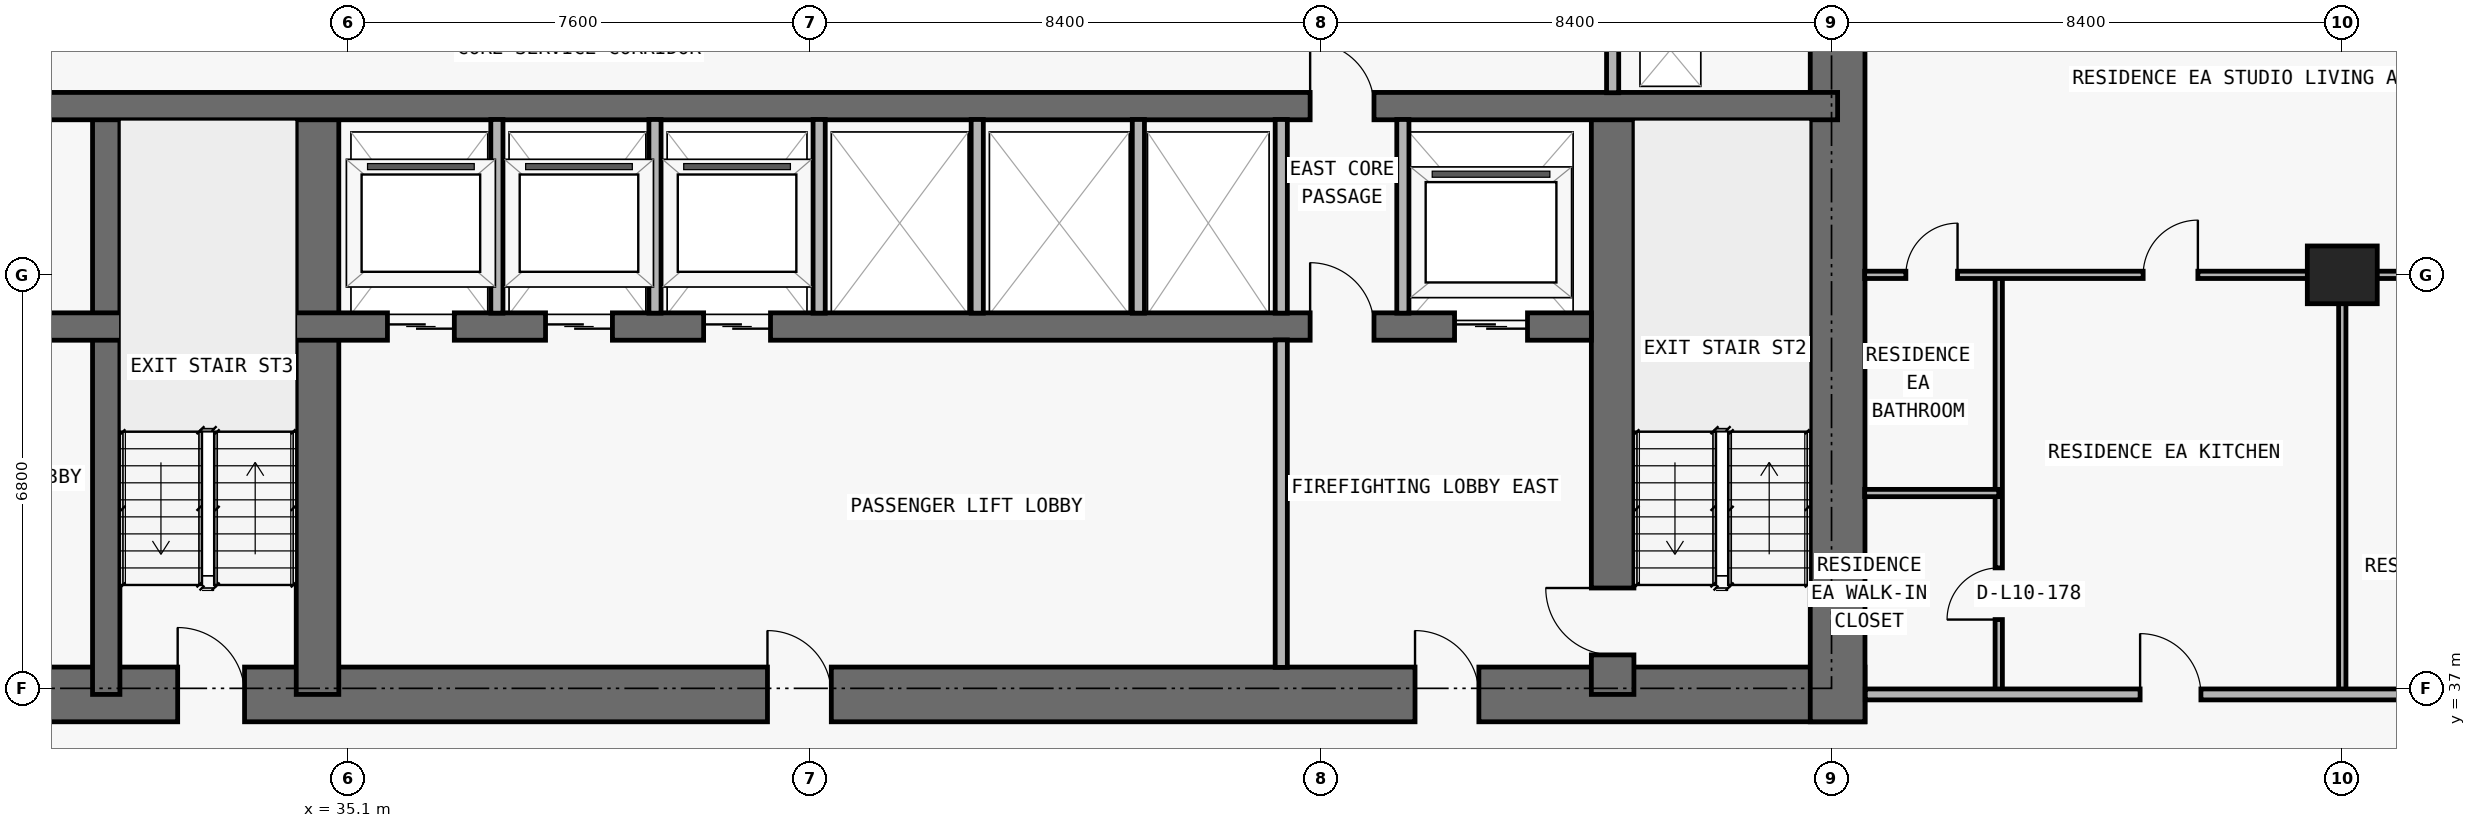
"""IFC4 building model, lengths in metres.
Left out: names, types, materials, properties, quantities, classifications, styles, units other than length and angle.
Written with IfcOpenShell. Run it as: python <this file> out.ifc"""

import sys

from ifc_helpers import new_model, si_unit, direction, frame, frame_2d, origin, origin_2d, place, context, subcontext, project, spatial, rectangle, extrude, element, fill, save


model = new_model("IFC4")
c1 = context("Model", 3, precision=1e-05, world=origin(), true_north=direction((0.0, 1.0)))
c2 = subcontext(c1, "Body", "Model", "MODEL_VIEW")
j1 = project(units=[si_unit("LENGTHUNIT", "METRE"), si_unit("PLANEANGLEUNIT", "RADIAN")], contexts=[c1])
p1 = place(None, origin())
s1 = spatial("IfcSite", under=j1, at=p1, CompositionType="ELEMENT")
p2 = place(p1, origin())
s2 = spatial("IfcBuilding", under=s1, at=p2, CompositionType="ELEMENT")
p3 = place(p2, frame((0.0, 0.0, 43.2)))
s3 = spatial("IfcBuildingStorey", under=s2, at=p3, CompositionType="ELEMENT", Elevation=43.2)
p4 = place(p3, frame((67.9, 43.8, 0.0), z_axis=(0.0, 0.0, 1.0), x_axis=(1.0, 0.0, 0.0)))
e1 = element("IfcColumn", 1, at=p4, inside=s3, PredefinedType="COLUMN", context=c2, shape_type="SweptSolid", body=[
    extrude(rectangle(XDim=1.15, YDim=0.95, at=origin_2d()), origin(), (0.0, 0.0, 1.0), 3.05),
])
p5 = place(p3, frame((17.75, 36.9, 0.0), z_axis=(0.0, 0.0, 1.0), x_axis=(1.0, 0.0, 0.0)))
e2 = element("IfcWall", 2, at=p5, inside=s3, PredefinedType="SHEAR", context=c2, shape_type="SweptSolid", body=[
    extrude(rectangle(XDim=42.3, YDim=0.9, at=frame_2d((21.15, 0.0))), origin(), (0.0, 0.0, 1.0), 3.05),
])
p6 = place(p5, frame((14.55, 0.0, 0.0)))
e3 = element("IfcOpeningElement", 3, at=p6, cuts=e2, PredefinedType="OPENING", context=c2, shape_type="SweptSolid", body=[
    extrude(rectangle(XDim=1.1, YDim=2.15, at=frame_2d((0.55, 1.075))), frame((0.0, 0.46, 0.0), z_axis=(0.0, -1.0, 0.0), x_axis=(1.0, 0.0, 0.0)), (0.0, 0.0, 1.0), 0.92),
])
p7 = place(p5, frame((6.4, 0.0, 0.0)))
e4 = element("IfcOpeningElement", 4, at=p7, cuts=e2, PredefinedType="OPENING", context=c2, shape_type="SweptSolid", body=[
    extrude(rectangle(XDim=1.05, YDim=2.15, at=frame_2d((0.525, 1.075))), frame((0.0, 0.46, 0.0), z_axis=(0.0, -1.0, 0.0), x_axis=(1.0, 0.0, 0.0)), (0.0, 0.0, 1.0), 0.92),
])
p8 = place(p5, frame((34.9, 0.0, 0.0)))
e5 = element("IfcOpeningElement", 5, at=p8, cuts=e2, PredefinedType="OPENING", context=c2, shape_type="SweptSolid", body=[
    extrude(rectangle(XDim=1.05, YDim=2.15, at=frame_2d((0.525, 1.075))), frame((0.0, 0.46, 0.0), z_axis=(0.0, -1.0, 0.0), x_axis=(1.0, 0.0, 0.0)), (0.0, 0.0, 1.0), 0.92),
])
p9 = place(p5, frame((11.012, 0.0, 0.0)))
e6 = element("IfcOpeningElement", 6, at=p9, cuts=e2, PredefinedType="OPENING", context=c2, shape_type="SweptSolid", body=[
    extrude(rectangle(XDim=1.05, YDim=2.15, at=frame_2d((0.525, 1.075))), frame((0.0, 0.46, 0.0), z_axis=(0.0, -1.0, 0.0), x_axis=(1.0, 0.0, 0.0)), (0.0, 0.0, 1.0), 0.92),
])
p10 = place(p5, frame((24.25, 0.0, 0.0)))
e7 = element("IfcOpeningElement", 7, at=p10, cuts=e2, PredefinedType="OPENING", context=c2, shape_type="SweptSolid", body=[
    extrude(rectangle(XDim=1.05, YDim=2.15, at=frame_2d((0.525, 1.075))), frame((0.0, 0.46, 0.0), z_axis=(0.0, -1.0, 0.0), x_axis=(1.0, 0.0, 0.0)), (0.0, 0.0, 1.0), 0.92),
])
p11 = place(p3, frame((59.6, 36.45, 0.0), z_axis=(0.0, 0.0, 1.0), x_axis=(0.0, 1.0, 0.0)))
e8 = element("IfcWall", 8, at=p11, inside=s3, PredefinedType="SHEAR", context=c2, shape_type="SweptSolid", body=[
    extrude(rectangle(XDim=14.15, YDim=0.9, at=frame_2d((7.075, 0.0))), origin(), (0.0, 0.0, 1.0), 3.05),
])
p12 = place(p3, frame((55.9, 36.9, 0.0), z_axis=(0.0, 0.0, 1.0), x_axis=(0.0, 1.0, 0.0)))
e9 = element("IfcWall", 9, at=p12, inside=s3, PredefinedType="SHEAR", context=c2, shape_type="SweptSolid", body=[
    extrude(rectangle(XDim=9.675, YDim=0.7, at=frame_2d((4.837, 0.0))), origin(), (0.0, 0.0, 1.0), 3.05),
])
p13 = place(p12, frame((0.65, 0.0, 0.0)))
e10 = element("IfcOpeningElement", 10, at=p13, cuts=e9, PredefinedType="OPENING", context=c2, shape_type="SweptSolid", body=[
    extrude(rectangle(XDim=1.1, YDim=2.15, at=frame_2d((0.55, 1.075))), frame((0.0, 0.36, 0.0), z_axis=(0.0, -1.0, 0.0), x_axis=(1.0, 0.0, 0.0)), (0.0, 0.0, 1.0), 0.72),
])
p14 = place(p3, frame((31.125, 36.9, 0.0), z_axis=(0.0, 0.0, 1.0), x_axis=(0.0, 1.0, 0.0)))
e11 = element("IfcWall", 11, at=p14, inside=s3, PredefinedType="SHEAR", context=c2, shape_type="SweptSolid", body=[
    extrude(rectangle(XDim=9.675, YDim=0.45, at=frame_2d((4.837, 0.0))), origin(), (0.0, 0.0, 1.0), 3.05),
])
p15 = place(p3, frame((34.6, 36.9, 0.0), z_axis=(0.0, 0.0, 1.0), x_axis=(0.0, 1.0, 0.0)))
e12 = element("IfcWall", 12, at=p15, inside=s3, PredefinedType="SHEAR", context=c2, shape_type="SweptSolid", body=[
    extrude(rectangle(XDim=9.675, YDim=0.7, at=frame_2d((4.837, 0.0))), origin(), (0.0, 0.0, 1.0), 3.05),
])
p16 = place(p3, frame((22.25, 42.95, 0.0), z_axis=(0.0, 0.0, 1.0), x_axis=(1.0, 0.0, 0.0)))
e13 = element("IfcWall", 13, at=p16, inside=s3, PredefinedType="SHEAR", context=c2, shape_type="SweptSolid", body=[
    extrude(rectangle(XDim=33.3, YDim=0.45, at=frame_2d((16.65, 0.0))), origin(), (0.0, 0.0, 1.0), 3.05),
])
p17 = place(p16, frame((1.05, 0.0, 0.0)))
e14 = element("IfcOpeningElement", 14, at=p17, cuts=e13, PredefinedType="OPENING", context=c2, shape_type="SweptSolid", body=[
    extrude(rectangle(XDim=1.2, YDim=2.2, at=frame_2d((0.6, 1.1))), frame((0.0, 0.235, 0.0), z_axis=(0.0, -1.0, 0.0), x_axis=(1.0, 0.0, 0.0)), (0.0, 0.0, 1.0), 0.47),
])
p18 = place(p16, frame((31.05, 0.0, 0.0)))
e15 = element("IfcOpeningElement", 15, at=p18, cuts=e13, PredefinedType="OPENING", context=c2, shape_type="SweptSolid", body=[
    extrude(rectangle(XDim=1.2, YDim=2.2, at=frame_2d((0.6, 1.1))), frame((0.0, 0.235, 0.0), z_axis=(0.0, -1.0, 0.0), x_axis=(1.0, 0.0, 0.0)), (0.0, 0.0, 1.0), 0.47),
])
p19 = place(p16, frame((13.5, 0.0, 0.0)))
e16 = element("IfcOpeningElement", 16, at=p19, cuts=e13, PredefinedType="OPENING", context=c2, shape_type="SweptSolid", body=[
    extrude(rectangle(XDim=1.1, YDim=2.2, at=frame_2d((0.55, 1.1))), frame((0.0, 0.235, 0.0), z_axis=(0.0, -1.0, 0.0), x_axis=(1.0, 0.0, 0.0)), (0.0, 0.0, 1.0), 0.47),
])
p20 = place(p16, frame((16.1, 0.0, 0.0)))
e17 = element("IfcOpeningElement", 17, at=p20, cuts=e13, PredefinedType="OPENING", context=c2, shape_type="SweptSolid", body=[
    extrude(rectangle(XDim=1.1, YDim=2.2, at=frame_2d((0.55, 1.1))), frame((0.0, 0.235, 0.0), z_axis=(0.0, -1.0, 0.0), x_axis=(1.0, 0.0, 0.0)), (0.0, 0.0, 1.0), 0.47),
])
p21 = place(p16, frame((18.7, 0.0, 0.0)))
e18 = element("IfcOpeningElement", 18, at=p21, cuts=e13, PredefinedType="OPENING", context=c2, shape_type="SweptSolid", body=[
    extrude(rectangle(XDim=1.1, YDim=2.2, at=frame_2d((0.55, 1.1))), frame((0.0, 0.235, 0.0), z_axis=(0.0, -1.0, 0.0), x_axis=(1.0, 0.0, 0.0)), (0.0, 0.0, 1.0), 0.47),
])
p22 = place(p16, frame((3.625, 0.0, 0.0)))
e19 = element("IfcOpeningElement", 19, at=p22, cuts=e13, PredefinedType="OPENING", context=c2, shape_type="SweptSolid", body=[
    extrude(rectangle(XDim=1.05, YDim=2.15, at=frame_2d((0.525, 1.075))), frame((0.0, 0.235, 0.0), z_axis=(0.0, -1.0, 0.0), x_axis=(1.0, 0.0, 0.0)), (0.0, 0.0, 1.0), 0.47),
])
p23 = place(p16, frame((28.675, 0.0, 0.0)))
e20 = element("IfcOpeningElement", 20, at=p23, cuts=e13, PredefinedType="OPENING", context=c2, shape_type="SweptSolid", body=[
    extrude(rectangle(XDim=1.05, YDim=2.15, at=frame_2d((0.525, 1.075))), frame((0.0, 0.235, 0.0), z_axis=(0.0, -1.0, 0.0), x_axis=(1.0, 0.0, 0.0)), (0.0, 0.0, 1.0), 0.47),
])
p24 = place(p3, frame((18.2, 46.575, 0.0), z_axis=(0.0, 0.0, 1.0), x_axis=(1.0, 0.0, 0.0)))
e21 = element("IfcWall", 21, at=p24, inside=s3, PredefinedType="SHEAR", context=c2, shape_type="SweptSolid", body=[
    extrude(rectangle(XDim=41.4, YDim=0.45, at=frame_2d((20.7, 0.0))), origin(), (0.0, 0.0, 1.0), 3.05),
])
p25 = place(p24, frame((7.675, 0.0, 0.0)))
e22 = element("IfcOpeningElement", 22, at=p25, cuts=e21, PredefinedType="OPENING", context=c2, shape_type="SweptSolid", body=[
    extrude(rectangle(XDim=1.05, YDim=2.15, at=frame_2d((0.525, 1.075))), frame((0.0, 0.235, 0.0), z_axis=(0.0, -1.0, 0.0), x_axis=(1.0, 0.0, 0.0)), (0.0, 0.0, 1.0), 0.47),
])
p26 = place(p24, frame((32.725, 0.0, 0.0)))
e23 = element("IfcOpeningElement", 23, at=p26, cuts=e21, PredefinedType="OPENING", context=c2, shape_type="SweptSolid", body=[
    extrude(rectangle(XDim=1.05, YDim=2.15, at=frame_2d((0.525, 1.075))), frame((0.0, 0.235, 0.0), z_axis=(0.0, -1.0, 0.0), x_axis=(1.0, 0.0, 0.0)), (0.0, 0.0, 1.0), 0.47),
])
for number, where, z_axis, x_axis in (
    (24, (37.55, 43.17, 0.0), (0.0, 0.0, 1.0), (0.0, 1.0, 0.0)),
    (25, (40.15, 43.17, 0.0), (0.0, 0.0, 1.0), (0.0, 1.0, 0.0)),
    (26, (42.85, 43.17, 0.0), (0.0, 0.0, 1.0), (0.0, 1.0, 0.0)),
    (27, (45.45, 43.17, 0.0), (0.0, 0.0, 1.0), (0.0, 1.0, 0.0)),
    (28, (48.1, 43.17, 0.0), (0.0, 0.0, 1.0), (0.0, 1.0, 0.0)),
):
    element("IfcWall", number, at=place(p3, frame(where, z_axis=z_axis, x_axis=x_axis)), inside=s3, PredefinedType="PARTITIONING", context=c2, shape_type="SweptSolid", body=[
        extrude(rectangle(XDim=3.185, YDim=0.2, at=frame_2d((1.593, 0.0))), origin(), (0.0, 0.0, 1.0), 3.05),
    ])
p27 = place(p3, frame((50.45, 37.345, 0.0), z_axis=(0.0, 0.0, 1.0), x_axis=(0.0, 1.0, 0.0)))
e29 = element("IfcWall", 29, at=p27, inside=s3, PredefinedType="PARTITIONING", context=c2, shape_type="SweptSolid", body=[
    extrude(rectangle(XDim=5.385, YDim=0.2, at=frame_2d((2.692, 0.0))), origin(), (0.0, 0.0, 1.0), 3.05),
])
for number, where, z_axis, x_axis in (
    (30, (50.45, 43.17, 0.0), (0.0, 0.0, 1.0), (0.0, 1.0, 0.0)),
    (31, (52.45, 43.17, 0.0), (0.0, 0.0, 1.0), (0.0, 1.0, 0.0)),
):
    element("IfcWall", number, at=place(p3, frame(where, z_axis=z_axis, x_axis=x_axis)), inside=s3, PredefinedType="PARTITIONING", context=c2, shape_type="SweptSolid", body=[
        extrude(rectangle(XDim=3.185, YDim=0.2, at=frame_2d((1.593, 0.0))), origin(), (0.0, 0.0, 1.0), 3.05),
    ])
p28 = place(p3, frame((55.9, 46.795, 0.0), z_axis=(0.0, 0.0, 1.0), x_axis=(0.0, 1.0, 0.0)))
e32 = element("IfcWall", 32, at=p28, inside=s3, PredefinedType="PARTITIONING", context=c2, shape_type="SweptSolid", body=[
    extrude(rectangle(XDim=3.06, YDim=0.2, at=frame_2d((1.53, 0.0))), origin(), (0.0, 0.0, 1.0), 3.05),
])
p29 = place(p3, frame((62.25, 36.9, 0.0), z_axis=(0.0, 0.0, 1.0), x_axis=(0.0, 1.0, 0.0)))
e33 = element("IfcWall", 33, at=p29, inside=s3, PredefinedType="PARTITIONING", context=c2, shape_type="SweptSolid", body=[
    extrude(rectangle(XDim=6.9, YDim=0.12, at=frame_2d((3.45, 0.0))), origin(), (0.0, 0.0, 1.0), 3.05),
])
p30 = place(p29, frame((1.231, 0.0, 0.0)))
e34 = element("IfcOpeningElement", 34, at=p30, cuts=e33, PredefinedType="OPENING", context=c2, shape_type="SweptSolid", body=[
    extrude(rectangle(XDim=0.85, YDim=2.1, at=frame_2d((0.425, 1.05))), frame((0.0, 0.07, 0.0), z_axis=(0.0, -1.0, 0.0), x_axis=(1.0, 0.0, 0.0)), (0.0, 0.0, 1.0), 0.14),
])
p31 = place(p3, frame((67.9, 36.9, 0.0), z_axis=(0.0, 0.0, 1.0), x_axis=(0.0, 1.0, 0.0)))
e35 = element("IfcWall", 35, at=p31, inside=s3, PredefinedType="PARTITIONING", context=c2, shape_type="SweptSolid", body=[
    extrude(rectangle(XDim=6.9, YDim=0.12, at=frame_2d((3.45, 0.0))), origin(), (0.0, 0.0, 1.0), 2.11),
])
p32 = place(p3, frame((60.055, 36.9, 0.0), z_axis=(0.0, 0.0, 1.0), x_axis=(1.0, 0.0, 0.0)))
e36 = element("IfcWall", 36, at=p32, inside=s3, PredefinedType="PARTITIONING", context=c2, shape_type="SweptSolid", body=[
    extrude(rectangle(XDim=12.645, YDim=0.18, at=frame_2d((6.323, 0.0))), origin(), (0.0, 0.0, 1.0), 3.05),
])
p33 = place(p32, frame((4.52, 0.0, 0.0)))
e37 = element("IfcOpeningElement", 37, at=p33, cuts=e36, PredefinedType="OPENING", context=c2, shape_type="SweptSolid", body=[
    extrude(rectangle(XDim=1.0, YDim=2.2, at=frame_2d((0.5, 1.1))), frame((0.0, 0.1, 0.0), z_axis=(0.0, -1.0, 0.0), x_axis=(1.0, 0.0, 0.0)), (0.0, 0.0, 1.0), 0.2),
])
p34 = place(p3, frame((60.045, 40.212, 0.0), z_axis=(0.0, 0.0, 1.0), x_axis=(1.0, 0.0, 0.0)))
e38 = element("IfcWall", 38, at=p34, inside=s3, PredefinedType="PARTITIONING", context=c2, shape_type="SweptSolid", body=[
    extrude(rectangle(XDim=2.205, YDim=0.12, at=frame_2d((1.103, 0.0))), origin(), (0.0, 0.0, 1.0), 3.05),
])
p35 = place(p3, frame((60.045, 43.8, 0.0), z_axis=(0.0, 0.0, 1.0), x_axis=(1.0, 0.0, 0.0)))
e39 = element("IfcWall", 39, at=p35, inside=s3, PredefinedType="PARTITIONING", context=c2, shape_type="SweptSolid", body=[
    extrude(rectangle(XDim=15.96, YDim=0.12, at=frame_2d((7.98, 0.0))), origin(), (0.0, 0.0, 1.0), 2.339),
])
p36 = place(p35, frame((9.805, 0.0, 0.0)))
e40 = element("IfcOpeningElement", 40, at=p36, cuts=e39, PredefinedType="OPENING", context=c2, shape_type="SweptSolid", body=[
    extrude(rectangle(XDim=0.9, YDim=2.15, at=frame_2d((0.45, 1.075))), frame((0.0, 0.07, 0.0), z_axis=(0.0, -1.0, 0.0), x_axis=(1.0, 0.0, 0.0)), (0.0, 0.0, 1.0), 0.14),
])
p37 = place(p35, frame((4.58, 0.0, 0.0)))
e41 = element("IfcOpeningElement", 41, at=p37, cuts=e39, PredefinedType="OPENING", context=c2, shape_type="SweptSolid", body=[
    extrude(rectangle(XDim=0.9, YDim=2.15, at=frame_2d((0.45, 1.075))), frame((0.0, 0.07, 0.0), z_axis=(0.0, -1.0, 0.0), x_axis=(1.0, 0.0, 0.0)), (0.0, 0.0, 1.0), 0.14),
])
p38 = place(p35, frame((0.677, 0.0, 0.0)))
e42 = element("IfcOpeningElement", 42, at=p38, cuts=e39, PredefinedType="OPENING", context=c2, shape_type="SweptSolid", body=[
    extrude(rectangle(XDim=0.85, YDim=2.1, at=frame_2d((0.425, 1.05))), frame((0.0, 0.07, 0.0), z_axis=(0.0, -1.0, 0.0), x_axis=(1.0, 0.0, 0.0)), (0.0, 0.0, 1.0), 0.14),
])
p39 = place(p18, origin())
e43 = element("IfcDoor", 43, at=p39, inside=s3, OperationType="DOUBLE_DOOR_SLIDING", PredefinedType="DOOR", context=c2, shape_type="SweptSolid", body=[
    extrude(rectangle(XDim=1.2, YDim=2.2, at=frame_2d((0.6, 1.1))), frame((0.0, 0.025, 0.0), z_axis=(0.0, -1.0, 0.0), x_axis=(1.0, 0.0, 0.0)), (0.0, 0.0, 1.0), 0.05),
])
fill(e15, e43)
p40 = place(p19, origin())
e44 = element("IfcDoor", 44, at=p40, inside=s3, OperationType="DOUBLE_DOOR_SLIDING", PredefinedType="DOOR", context=c2, shape_type="SweptSolid", body=[
    extrude(rectangle(XDim=1.1, YDim=2.2, at=frame_2d((0.55, 1.1))), frame((0.0, 0.025, 0.0), z_axis=(0.0, -1.0, 0.0), x_axis=(1.0, 0.0, 0.0)), (0.0, 0.0, 1.0), 0.05),
])
fill(e16, e44)
p41 = place(p20, origin())
e45 = element("IfcDoor", 45, at=p41, inside=s3, OperationType="DOUBLE_DOOR_SLIDING", PredefinedType="DOOR", context=c2, shape_type="SweptSolid", body=[
    extrude(rectangle(XDim=1.1, YDim=2.2, at=frame_2d((0.55, 1.1))), frame((0.0, 0.025, 0.0), z_axis=(0.0, -1.0, 0.0), x_axis=(1.0, 0.0, 0.0)), (0.0, 0.0, 1.0), 0.05),
])
fill(e17, e45)
p42 = place(p21, origin())
e46 = element("IfcDoor", 46, at=p42, inside=s3, OperationType="DOUBLE_DOOR_SLIDING", PredefinedType="DOOR", context=c2, shape_type="SweptSolid", body=[
    extrude(rectangle(XDim=1.1, YDim=2.2, at=frame_2d((0.55, 1.1))), frame((0.0, 0.025, 0.0), z_axis=(0.0, -1.0, 0.0), x_axis=(1.0, 0.0, 0.0)), (0.0, 0.0, 1.0), 0.05),
])
fill(e18, e46)
p43 = place(p6, origin())
e47 = element("IfcDoor", 47, at=p43, inside=s3, OperationType="SINGLE_SWING_LEFT", PredefinedType="DOOR", context=c2, shape_type="SweptSolid", body=[
    extrude(rectangle(XDim=1.1, YDim=2.15, at=frame_2d((0.55, 1.075))), frame((0.0, 0.025, 0.0), z_axis=(0.0, -1.0, 0.0), x_axis=(1.0, 0.0, 0.0)), (0.0, 0.0, 1.0), 0.05),
])
fill(e3, e47)
p44 = place(p8, origin())
e48 = element("IfcDoor", 48, at=p44, inside=s3, OperationType="SINGLE_SWING_LEFT", PredefinedType="DOOR", context=c2, shape_type="SweptSolid", body=[
    extrude(rectangle(XDim=1.05, YDim=2.15, at=frame_2d((0.525, 1.075))), frame((0.0, 0.025, 0.0), z_axis=(0.0, -1.0, 0.0), x_axis=(1.0, 0.0, 0.0)), (0.0, 0.0, 1.0), 0.05),
])
fill(e5, e48)
p45 = place(p13, origin())
e49 = element("IfcDoor", 49, at=p45, inside=s3, OperationType="SINGLE_SWING_RIGHT", PredefinedType="DOOR", context=c2, shape_type="SweptSolid", body=[
    extrude(rectangle(XDim=1.1, YDim=2.15, at=frame_2d((0.55, 1.075))), frame((0.0, 0.025, 0.0), z_axis=(0.0, -1.0, 0.0), x_axis=(1.0, 0.0, 0.0)), (0.0, 0.0, 1.0), 0.05),
])
fill(e10, e49)
p46 = place(p23, origin())
e50 = element("IfcDoor", 50, at=p46, inside=s3, OperationType="SINGLE_SWING_LEFT", PredefinedType="DOOR", context=c2, shape_type="SweptSolid", body=[
    extrude(rectangle(XDim=1.05, YDim=2.15, at=frame_2d((0.525, 1.075))), frame((0.0, 0.025, 0.0), z_axis=(0.0, -1.0, 0.0), x_axis=(1.0, 0.0, 0.0)), (0.0, 0.0, 1.0), 0.05),
])
fill(e20, e50)
p47 = place(p10, origin())
e51 = element("IfcDoor", 51, at=p47, inside=s3, OperationType="SINGLE_SWING_LEFT", PredefinedType="DOOR", context=c2, shape_type="SweptSolid", body=[
    extrude(rectangle(XDim=1.05, YDim=2.15, at=frame_2d((0.525, 1.075))), frame((0.0, 0.025, 0.0), z_axis=(0.0, -1.0, 0.0), x_axis=(1.0, 0.0, 0.0)), (0.0, 0.0, 1.0), 0.05),
])
fill(e7, e51)
p48 = place(p26, origin())
e52 = element("IfcDoor", 52, at=p48, inside=s3, OperationType="SINGLE_SWING_LEFT", PredefinedType="DOOR", context=c2, shape_type="SweptSolid", body=[
    extrude(rectangle(XDim=1.05, YDim=2.15, at=frame_2d((0.525, 1.075))), frame((0.0, 0.025, 0.0), z_axis=(0.0, -1.0, 0.0), x_axis=(1.0, 0.0, 0.0)), (0.0, 0.0, 1.0), 0.05),
])
fill(e23, e52)
p49 = place(p33, origin())
e53 = element("IfcDoor", 53, at=p49, inside=s3, OperationType="SINGLE_SWING_LEFT", PredefinedType="DOOR", context=c2, shape_type="SweptSolid", body=[
    extrude(rectangle(XDim=1.0, YDim=2.2, at=frame_2d((0.5, 1.1))), frame((0.0, 0.025, 0.0), z_axis=(0.0, -1.0, 0.0), x_axis=(1.0, 0.0, 0.0)), (0.0, 0.0, 1.0), 0.05),
])
fill(e37, e53)
p50 = place(p37, origin())
e54 = element("IfcDoor", 54, at=p50, inside=s3, OperationType="SINGLE_SWING_RIGHT", PredefinedType="DOOR", context=c2, shape_type="SweptSolid", body=[
    extrude(rectangle(XDim=0.9, YDim=2.15, at=frame_2d((0.45, 1.075))), frame((0.0, 0.025, 0.0), z_axis=(0.0, -1.0, 0.0), x_axis=(1.0, 0.0, 0.0)), (0.0, 0.0, 1.0), 0.05),
])
fill(e41, e54)
p51 = place(p30, origin())
e55 = element("IfcDoor", 55, at=p51, inside=s3, OperationType="SINGLE_SWING_LEFT", PredefinedType="DOOR", context=c2, shape_type="SweptSolid", body=[
    extrude(rectangle(XDim=0.85, YDim=2.1, at=frame_2d((0.425, 1.05))), frame((0.0, 0.025, 0.0), z_axis=(0.0, -1.0, 0.0), x_axis=(1.0, 0.0, 0.0)), (0.0, 0.0, 1.0), 0.05),
])
fill(e34, e55)
p52 = place(p38, origin())
e56 = element("IfcDoor", 56, at=p52, inside=s3, OperationType="SINGLE_SWING_RIGHT", PredefinedType="DOOR", context=c2, shape_type="SweptSolid", body=[
    extrude(rectangle(XDim=0.85, YDim=2.1, at=frame_2d((0.425, 1.05))), frame((0.0, 0.025, 0.0), z_axis=(0.0, -1.0, 0.0), x_axis=(1.0, 0.0, 0.0)), (0.0, 0.0, 1.0), 0.05),
])
fill(e42, e56)
save(model, sys.argv[1])
